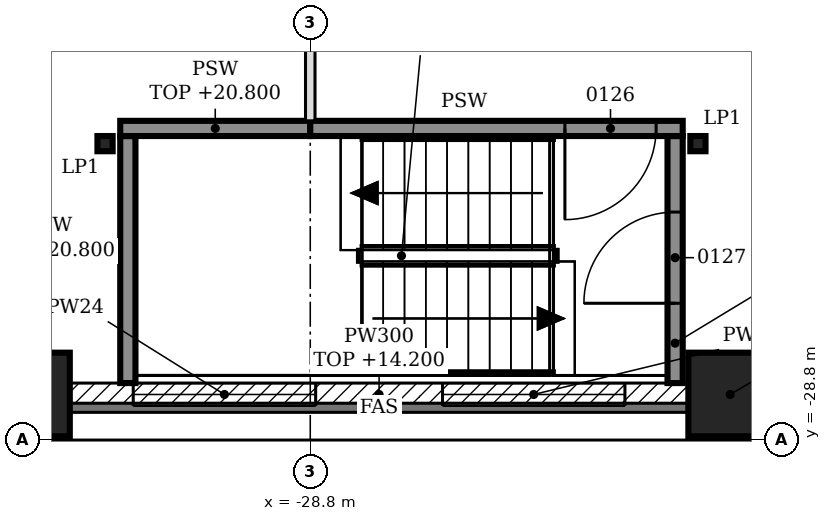
"""IFC4 building model, lengths in metres.
Left out: names, types, materials, properties, quantities, classifications, styles, units other than length and angle.
Written with IfcOpenShell. Run it as: python <this file> out.ifc"""

import sys

from ifc_helpers import new_model, si_unit, direction, frame, frame_2d, origin, origin_2d, place, context, subcontext, project, spatial, polyline, rectangle, hollow_rectangle, i_section, outline, extrude, element, fill, save


model = new_model("IFC4")
c1 = context("Model", 3, precision=1e-05, world=origin(), true_north=direction((0.0, 1.0)))
c2 = subcontext(c1, "Body", "Model", "MODEL_VIEW")
j1 = project(units=[si_unit("LENGTHUNIT", "METRE"), si_unit("PLANEANGLEUNIT", "RADIAN")], contexts=[c1])
p1 = place(None, origin())
s1 = spatial("IfcSite", under=j1, at=p1, CompositionType="ELEMENT")
p2 = place(p1, origin())
s2 = spatial("IfcBuilding", under=s1, at=p2, CompositionType="ELEMENT")
p3 = place(p2, frame((0.0, 0.0, 9.0)))
s3 = spatial("IfcBuildingStorey", under=s2, at=p3, CompositionType="ELEMENT", Elevation=9.0)
for number, where, z_axis, x_axis in (
    (1, (-32.514, -28.2, 0.0), (0.0, 0.0, 1.0), (1.0, 0.0, 0.0)),
    (2, (-23.276, -28.2, 0.0), (0.0, 0.0, 1.0), (1.0, 0.0, 0.0)),
):
    element("IfcColumn", number, at=place(p3, frame(where, z_axis=z_axis, x_axis=x_axis)), inside=s3, PredefinedType="COLUMN", context=c2, shape_type="SweptSolid", body=[
        extrude(hollow_rectangle(XDim=1.1, YDim=1.1, WallThickness=0.06, at=origin_2d()), origin(), (0.0, 0.0, 1.0), 6.0),
    ])
for number, where, z_axis, x_axis in (
    (3, (-31.5, -24.9, 0.0), (0.0, 0.0, 1.0), (1.0, 0.0, 0.0)),
    (4, (-23.7, -24.9, 0.0), (0.0, 0.0, 1.0), (1.0, 0.0, 0.0)),
):
    element("IfcColumn", number, at=place(p3, frame(where, z_axis=z_axis, x_axis=x_axis)), inside=s3, PredefinedType="COLUMN", context=c2, shape_type="SweptSolid", body=[
        extrude(i_section(OverallWidth=0.2, OverallDepth=0.2, WebThickness=0.009, FlangeThickness=0.015, FilletRadius=0.018, at=origin_2d()), origin(), (0.0, 0.0, 1.0), 6.0),
    ])
p4 = place(p3, frame((-31.964, -28.2, 0.0), z_axis=(0.0, 0.0, 1.0), x_axis=(1.0, 0.0, 0.0)))
e5 = element("IfcWall", 5, at=p4, inside=s3, PredefinedType="SOLIDWALL", context=c2, shape_type="SweptSolid", body=[
    extrude(rectangle(XDim=8.138, YDim=0.3, at=frame_2d((4.069, 0.0))), origin(), (0.0, 0.0, 1.0), 5.2),
])
p5 = place(p4, frame((0.834, 0.0, 0.9)))
e6 = element("IfcOpeningElement", 6, at=p5, cuts=e5, PredefinedType="OPENING", context=c2, shape_type="SweptSolid", body=[
    extrude(rectangle(XDim=2.4, YDim=2.4, at=frame_2d((1.2, 1.2))), frame((0.0, 0.16, 0.0), z_axis=(0.0, -1.0, 0.0), x_axis=(1.0, 0.0, 0.0)), (0.0, 0.0, 1.0), 0.32),
])
p6 = place(p4, frame((4.903, 0.0, 0.9)))
e7 = element("IfcOpeningElement", 7, at=p6, cuts=e5, PredefinedType="OPENING", context=c2, shape_type="SweptSolid", body=[
    extrude(rectangle(XDim=2.4, YDim=2.4, at=frame_2d((1.2, 1.2))), frame((0.0, 0.16, 0.0), z_axis=(0.0, -1.0, 0.0), x_axis=(1.0, 0.0, 0.0)), (0.0, 0.0, 1.0), 0.32),
])
p7 = place(p3, frame((-31.2, -28.05, 0.0), z_axis=(0.0, 0.0, 1.0), x_axis=(0.0, 1.0, 0.0)))
e8 = element("IfcWall", 8, at=p7, inside=s3, PredefinedType="SOLIDWALL", context=c2, shape_type="SweptSolid", body=[
    extrude(rectangle(XDim=3.25, YDim=0.2, at=frame_2d((1.625, 0.0))), origin(), (0.0, 0.0, 1.0), 11.8),
])
p8 = place(p3, frame((-24.0, -28.05, 0.0), z_axis=(0.0, 0.0, 1.0), x_axis=(0.0, 1.0, 0.0)))
e9 = element("IfcWall", 9, at=p8, inside=s3, PredefinedType="SOLIDWALL", context=c2, shape_type="SweptSolid", body=[
    extrude(rectangle(XDim=3.25, YDim=0.2, at=frame_2d((1.625, 0.0))), origin(), (0.0, 0.0, 1.0), 5.8),
])
p9 = place(p8, frame((1.05, 0.0, 0.0)))
e10 = element("IfcOpeningElement", 10, at=p9, cuts=e9, PredefinedType="OPENING", context=c2, shape_type="SweptSolid", body=[
    extrude(rectangle(XDim=1.2, YDim=2.1, at=frame_2d((0.6, 1.05))), frame((0.0, 0.11, 0.0), z_axis=(0.0, -1.0, 0.0), x_axis=(1.0, 0.0, 0.0)), (0.0, 0.0, 1.0), 0.22),
])
p10 = place(p3, frame((-31.3, -24.7, 0.0), z_axis=(0.0, 0.0, 1.0), x_axis=(1.0, 0.0, 0.0)))
e11 = element("IfcWall", 11, at=p10, inside=s3, PredefinedType="SOLIDWALL", context=c2, shape_type="SweptSolid", body=[
    extrude(rectangle(XDim=2.5, YDim=0.2, at=frame_2d((1.25, 0.0))), origin(), (0.0, 0.0, 1.0), 11.8),
])
p11 = place(p3, frame((-28.8, -24.7, 0.0), z_axis=(0.0, 0.0, 1.0), x_axis=(1.0, 0.0, 0.0)))
e12 = element("IfcWall", 12, at=p11, inside=s3, PredefinedType="SOLIDWALL", context=c2, shape_type="SweptSolid", body=[
    extrude(rectangle(XDim=4.9, YDim=0.2, at=frame_2d((2.45, 0.0))), origin(), (0.0, 0.0, 1.0), 5.8),
])
p12 = place(p11, frame((3.35, 0.0, 0.0)))
e13 = element("IfcOpeningElement", 13, at=p12, cuts=e12, PredefinedType="OPENING", context=c2, shape_type="SweptSolid", body=[
    extrude(rectangle(XDim=1.2, YDim=2.1, at=frame_2d((0.6, 1.05))), frame((0.0, 0.11, 0.0), z_axis=(0.0, -1.0, 0.0), x_axis=(1.0, 0.0, 0.0)), (0.0, 0.0, 1.0), 0.22),
])
p13 = place(p3, frame((-28.8, -24.6, 0.0), z_axis=(0.0, 0.0, 1.0), x_axis=(0.0, 1.0, 0.0)))
e14 = element("IfcWall", 14, at=p13, inside=s3, PredefinedType="PARTITIONING", context=c2, shape_type="SweptSolid", body=[
    extrude(outline(polyline([(0.0, 0.0), (49.2, 0.0), (49.2, 11.8), (43.95, 11.8), (43.948, 11.18), (43.65, 11.18), (43.648, 11.8), (39.15, 11.8), (39.148, 11.18), (38.85, 11.18), (38.848, 11.8), (34.35, 11.8), (34.348, 11.18), (34.05, 11.18), (34.048, 11.8), (29.55, 11.8), (29.548, 11.18), (29.25, 11.18), (29.248, 11.8), (24.75, 11.8), (24.748, 11.18), (24.45, 11.18), (24.448, 11.8), (19.95, 11.8), (19.948, 11.18), (19.65, 11.18), (19.648, 11.8), (15.15, 11.8), (15.148, 11.18), (14.85, 11.18), (14.848, 11.8), (10.35, 11.8), (10.348, 11.18), (10.05, 11.18), (10.048, 11.8), (5.55, 11.8), (5.548, 11.18), (5.25, 11.18), (5.248, 11.8), (0.0, 11.8), (0.0, 0.0)])), frame((0.0, 0.062, 0.0), z_axis=(0.0, -1.0, 0.0), x_axis=(1.0, 0.0, 0.0)), (0.0, 0.0, 1.0), 0.125),
])
p14 = place(p13, frame((1.7, 0.0, 0.0)))
e15 = element("IfcOpeningElement", 15, at=p14, cuts=e14, PredefinedType="OPENING", context=c2, shape_type="SweptSolid", body=[
    extrude(rectangle(XDim=1.8, YDim=2.1, at=frame_2d((0.9, 1.05))), frame((0.0, 0.073, 0.0), z_axis=(0.0, -1.0, 0.0), x_axis=(1.0, 0.0, 0.0)), (0.0, 0.0, 1.0), 0.145),
])
p15 = place(p13, frame((5.7, 0.0, 0.0)))
e16 = element("IfcOpeningElement", 16, at=p15, cuts=e14, PredefinedType="OPENING", context=c2, shape_type="SweptSolid", body=[
    extrude(rectangle(XDim=1.8, YDim=2.1, at=frame_2d((0.9, 1.05))), frame((0.0, 0.073, 0.0), z_axis=(0.0, -1.0, 0.0), x_axis=(1.0, 0.0, 0.0)), (0.0, 0.0, 1.0), 0.145),
])
p16 = place(p13, frame((12.7, 0.0, 0.0)))
e17 = element("IfcOpeningElement", 17, at=p16, cuts=e14, PredefinedType="OPENING", context=c2, shape_type="SweptSolid", body=[
    extrude(rectangle(XDim=1.8, YDim=2.1, at=frame_2d((0.9, 1.05))), frame((0.0, 0.073, 0.0), z_axis=(0.0, -1.0, 0.0), x_axis=(1.0, 0.0, 0.0)), (0.0, 0.0, 1.0), 0.145),
])
p17 = place(p13, frame((16.2, 0.0, 0.0)))
e18 = element("IfcOpeningElement", 18, at=p17, cuts=e14, PredefinedType="OPENING", context=c2, shape_type="SweptSolid", body=[
    extrude(rectangle(XDim=1.8, YDim=2.1, at=frame_2d((0.9, 1.05))), frame((0.0, 0.073, 0.0), z_axis=(0.0, -1.0, 0.0), x_axis=(1.0, 0.0, 0.0)), (0.0, 0.0, 1.0), 0.145),
])
p18 = place(p13, frame((31.2, 0.0, 0.0)))
e19 = element("IfcOpeningElement", 19, at=p18, cuts=e14, PredefinedType="OPENING", context=c2, shape_type="SweptSolid", body=[
    extrude(rectangle(XDim=1.8, YDim=2.1, at=frame_2d((0.9, 1.05))), frame((0.0, 0.073, 0.0), z_axis=(0.0, -1.0, 0.0), x_axis=(1.0, 0.0, 0.0)), (0.0, 0.0, 1.0), 0.145),
])
p19 = place(p13, frame((34.7, 0.0, 0.0)))
e20 = element("IfcOpeningElement", 20, at=p19, cuts=e14, PredefinedType="OPENING", context=c2, shape_type="SweptSolid", body=[
    extrude(rectangle(XDim=1.8, YDim=2.1, at=frame_2d((0.9, 1.05))), frame((0.0, 0.073, 0.0), z_axis=(0.0, -1.0, 0.0), x_axis=(1.0, 0.0, 0.0)), (0.0, 0.0, 1.0), 0.145),
])
p20 = place(p13, frame((41.7, 0.0, 0.0)))
e21 = element("IfcOpeningElement", 21, at=p20, cuts=e14, PredefinedType="OPENING", context=c2, shape_type="SweptSolid", body=[
    extrude(rectangle(XDim=1.8, YDim=2.1, at=frame_2d((0.9, 1.05))), frame((0.0, 0.073, 0.0), z_axis=(0.0, -1.0, 0.0), x_axis=(1.0, 0.0, 0.0)), (0.0, 0.0, 1.0), 0.145),
])
p21 = place(p13, frame((45.7, 0.0, 0.0)))
e22 = element("IfcOpeningElement", 22, at=p21, cuts=e14, PredefinedType="OPENING", context=c2, shape_type="SweptSolid", body=[
    extrude(rectangle(XDim=1.8, YDim=2.1, at=frame_2d((0.9, 1.05))), frame((0.0, 0.073, 0.0), z_axis=(0.0, -1.0, 0.0), x_axis=(1.0, 0.0, 0.0)), (0.0, 0.0, 1.0), 0.145),
])
p22 = place(p5, origin())
e23 = element("IfcWindow", 23, at=p22, inside=s3, PartitioningType="SINGLE_PANEL", PredefinedType="WINDOW", context=c2, shape_type="SweptSolid", body=[
    extrude(rectangle(XDim=2.4, YDim=2.4, at=frame_2d((1.2, 1.2))), frame((0.0, 0.03, 0.0), z_axis=(0.0, -1.0, 0.0), x_axis=(1.0, 0.0, 0.0)), (0.0, 0.0, 1.0), 0.06),
])
fill(e6, e23)
p23 = place(p6, origin())
e24 = element("IfcWindow", 24, at=p23, inside=s3, PartitioningType="SINGLE_PANEL", PredefinedType="WINDOW", context=c2, shape_type="SweptSolid", body=[
    extrude(rectangle(XDim=2.4, YDim=2.4, at=frame_2d((1.2, 1.2))), frame((0.0, 0.03, 0.0), z_axis=(0.0, -1.0, 0.0), x_axis=(1.0, 0.0, 0.0)), (0.0, 0.0, 1.0), 0.06),
])
fill(e7, e24)
p24 = place(p12, frame((1.2, 0.0, 0.0), z_axis=(0.0, 0.0, 1.0), x_axis=(-1.0, 0.0, 0.0)))
e25 = element("IfcDoor", 25, at=p24, inside=s3, OperationType="SINGLE_SWING_RIGHT", PredefinedType="DOOR", context=c2, shape_type="SweptSolid", body=[
    extrude(rectangle(XDim=1.2, YDim=2.1, at=frame_2d((0.6, 1.05))), frame((0.0, 0.025, 0.0), z_axis=(0.0, -1.0, 0.0), x_axis=(1.0, 0.0, 0.0)), (0.0, 0.0, 1.0), 0.05),
])
fill(e13, e25)
p25 = place(p9, origin())
e26 = element("IfcDoor", 26, at=p25, inside=s3, OperationType="SINGLE_SWING_LEFT", PredefinedType="DOOR", context=c2, shape_type="SweptSolid", body=[
    extrude(rectangle(XDim=1.2, YDim=2.1, at=frame_2d((0.6, 1.05))), frame((0.0, 0.025, 0.0), z_axis=(0.0, -1.0, 0.0), x_axis=(1.0, 0.0, 0.0)), (0.0, 0.0, 1.0), 0.05),
])
fill(e10, e26)
save(model, sys.argv[1])
